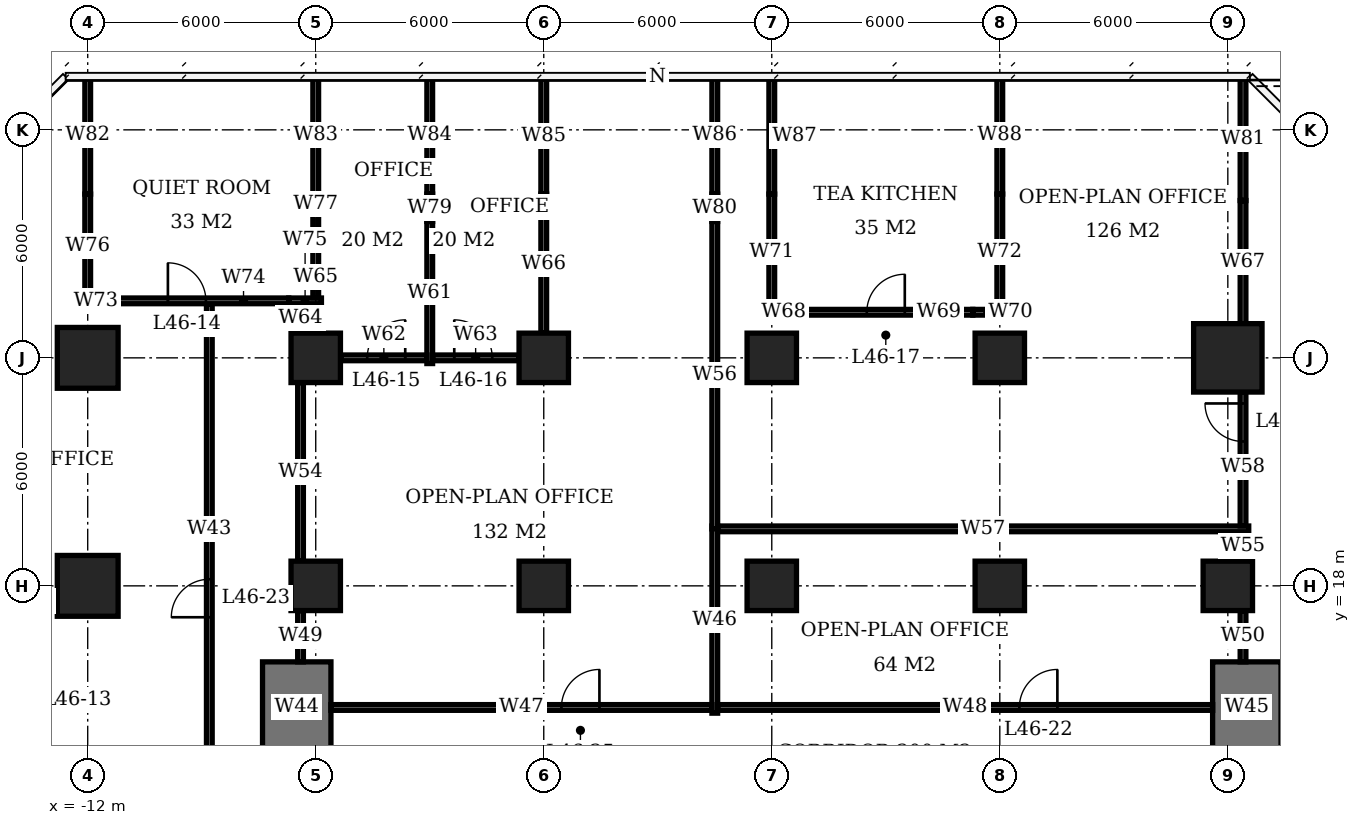
"""IFC4 building model, lengths in metres.
Left out: names, types, materials, properties, quantities, classifications, styles, units other than length and angle.
Written with IfcOpenShell. Run it as: python <this file> out.ifc"""

import sys

from ifc_helpers import new_model, si_unit, direction, frame, frame_2d, origin, origin_2d, place, context, subcontext, project, spatial, rectangle, extrude, element, fill, save


model = new_model("IFC4")
c1 = context("Model", 3, precision=1e-05, world=origin(), true_north=direction((0.0, 1.0)))
c2 = subcontext(c1, "Body", "Model", "MODEL_VIEW")
j1 = project(units=[si_unit("LENGTHUNIT", "METRE"), si_unit("PLANEANGLEUNIT", "RADIAN")], contexts=[c1])
p1 = place(None, origin())
s1 = spatial("IfcSite", under=j1, at=p1, CompositionType="ELEMENT")
p2 = place(p1, origin())
s2 = spatial("IfcBuilding", under=s1, at=p2, CompositionType="ELEMENT")
p3 = place(p2, frame((0.0, 0.0, 188.9)))
s3 = spatial("IfcBuildingStorey", under=s2, at=p3, CompositionType="ELEMENT", Elevation=188.9)
for number, where, z_axis, x_axis in (
    (1, (-12.0, 18.0, 0.0), (0.0, 0.0, 1.0), (1.0, 0.0, 0.0)),
    (2, (-12.0, 24.0, 0.0), (0.0, 0.0, 1.0), (1.0, 0.0, 0.0)),
):
    element("IfcColumn", number, at=place(p3, frame(where, z_axis=z_axis, x_axis=x_axis)), inside=s3, PredefinedType="COLUMN", context=c2, shape_type="SweptSolid", body=[
        extrude(rectangle(XDim=1.6, YDim=1.6, at=origin_2d()), origin(), (0.0, 0.0, 1.0), 3.9),
    ])
for number, where, z_axis, x_axis in (
    (3, (-6.0, 18.0, 0.0), (0.0, 0.0, 1.0), (1.0, 0.0, 0.0)),
    (4, (-6.0, 24.0, 0.0), (0.0, 0.0, 1.0), (1.0, 0.0, 0.0)),
    (5, (0.0, 18.0, 0.0), (0.0, 0.0, 1.0), (1.0, 0.0, 0.0)),
    (6, (0.0, 24.0, 0.0), (0.0, 0.0, 1.0), (1.0, 0.0, 0.0)),
    (7, (6.0, 18.0, 0.0), (0.0, 0.0, 1.0), (1.0, 0.0, 0.0)),
    (8, (6.0, 24.0, 0.0), (0.0, 0.0, 1.0), (1.0, 0.0, 0.0)),
    (9, (12.0, 18.0, 0.0), (0.0, 0.0, 1.0), (1.0, 0.0, 0.0)),
    (10, (12.0, 24.0, 0.0), (0.0, 0.0, 1.0), (1.0, 0.0, 0.0)),
    (11, (18.0, 18.0, 0.0), (0.0, 0.0, 1.0), (1.0, 0.0, 0.0)),
):
    element("IfcColumn", number, at=place(p3, frame(where, z_axis=z_axis, x_axis=x_axis)), inside=s3, PredefinedType="COLUMN", context=c2, shape_type="SweptSolid", body=[
        extrude(rectangle(XDim=1.3, YDim=1.3, at=origin_2d()), origin(), (0.0, 0.0, 1.0), 3.9),
    ])
p4 = place(p3, frame((18.0, 24.0, 0.0), z_axis=(0.0, 0.0, 1.0), x_axis=(1.0, 0.0, 0.0)))
e12 = element("IfcColumn", 12, at=p4, inside=s3, PredefinedType="COLUMN", context=c2, shape_type="SweptSolid", body=[
    extrude(rectangle(XDim=1.8, YDim=1.8, at=origin_2d()), origin(), (0.0, 0.0, 1.0), 3.9),
])
for number, where, z_axis, x_axis in (
    (13, (-6.5, 13.6, 0.0), (0.0, 0.0, 1.0), (0.0, 1.0, 0.0)),
    (14, (18.5, 13.6, 0.0), (0.0, 0.0, 1.0), (0.0, 1.0, 0.0)),
):
    element("IfcWall", number, at=place(p3, frame(where, z_axis=z_axis, x_axis=x_axis)), inside=s3, PredefinedType="SHEAR", context=c2, shape_type="SweptSolid", body=[
        extrude(rectangle(XDim=2.4, YDim=1.8, at=frame_2d((1.2, 0.0))), origin(), (0.0, 0.0, 1.0), 3.9),
    ])
p5 = place(p3, frame((-5.34, 24.0, 0.0), z_axis=(0.0, 0.0, 1.0), x_axis=(1.0, 0.0, 0.0)))
e15 = element("IfcWall", 15, at=p5, inside=s3, PredefinedType="PARTITIONING", context=c2, shape_type="SweptSolid", body=[
    extrude(rectangle(XDim=2.265, YDim=0.15, at=frame_2d((1.133, 0.0))), origin(), (0.0, 0.0, 1.0), 3.65),
])
p6 = place(p5, frame((0.695, 0.0, 0.0)))
e16 = element("IfcOpeningElement", 16, at=p6, cuts=e15, PredefinedType="OPENING", context=c2, shape_type="SweptSolid", body=[
    extrude(rectangle(XDim=1.0, YDim=2.1, at=frame_2d((0.5, 1.05))), frame((0.0, 0.085, 0.0), z_axis=(0.0, -1.0, 0.0), x_axis=(1.0, 0.0, 0.0)), (0.0, 0.0, 1.0), 0.17),
])
p7 = place(p3, frame((-2.925, 24.0, 0.0), z_axis=(0.0, 0.0, 1.0), x_axis=(1.0, 0.0, 0.0)))
e17 = element("IfcWall", 17, at=p7, inside=s3, PredefinedType="PARTITIONING", context=c2, shape_type="SweptSolid", body=[
    extrude(rectangle(XDim=2.265, YDim=0.15, at=frame_2d((1.133, 0.0))), origin(), (0.0, 0.0, 1.0), 3.65),
])
p8 = place(p7, frame((0.57, 0.0, 0.0)))
e18 = element("IfcOpeningElement", 18, at=p8, cuts=e17, PredefinedType="OPENING", context=c2, shape_type="SweptSolid", body=[
    extrude(rectangle(XDim=1.0, YDim=2.1, at=frame_2d((0.5, 1.05))), frame((0.0, 0.085, 0.0), z_axis=(0.0, -1.0, 0.0), x_axis=(1.0, 0.0, 0.0)), (0.0, 0.0, 1.0), 0.17),
])
p9 = place(p3, frame((5.925, 25.2, 0.0), z_axis=(0.0, 0.0, 1.0), x_axis=(1.0, 0.0, 0.0)))
e19 = element("IfcWall", 19, at=p9, inside=s3, PredefinedType="PARTITIONING", context=c2, shape_type="SweptSolid", body=[
    extrude(rectangle(XDim=0.785, YDim=0.15, at=frame_2d((0.393, 0.0))), origin(), (0.0, 0.0, 1.0), 2.65),
])
p10 = place(p3, frame((6.71, 25.2, 0.0), z_axis=(0.0, 0.0, 1.0), x_axis=(1.0, 0.0, 0.0)))
e20 = element("IfcWall", 20, at=p10, inside=s3, PredefinedType="PARTITIONING", context=c2, shape_type="SweptSolid", body=[
    extrude(rectangle(XDim=4.58, YDim=0.15, at=frame_2d((2.29, 0.0))), origin(), (0.0, 0.0, 1.0), 3.65),
])
p11 = place(p10, frame((1.79, 0.0, 0.0)))
e21 = element("IfcOpeningElement", 21, at=p11, cuts=e20, PredefinedType="OPENING", context=c2, shape_type="SweptSolid", body=[
    extrude(rectangle(XDim=1.0, YDim=2.1, at=frame_2d((0.5, 1.05))), frame((0.0, 0.085, 0.0), z_axis=(0.0, -1.0, 0.0), x_axis=(1.0, 0.0, 0.0)), (0.0, 0.0, 1.0), 0.17),
])
p12 = place(p3, frame((11.29, 25.2, 0.0), z_axis=(0.0, 0.0, 1.0), x_axis=(1.0, 0.0, 0.0)))
e22 = element("IfcWall", 22, at=p12, inside=s3, PredefinedType="PARTITIONING", context=c2, shape_type="SweptSolid", body=[
    extrude(rectangle(XDim=0.785, YDim=0.15, at=frame_2d((0.393, 0.0))), origin(), (0.0, 0.0, 1.0), 2.65),
])
p13 = place(p3, frame((-12.075, 25.5, 0.0), z_axis=(0.0, 0.0, 1.0), x_axis=(1.0, 0.0, 0.0)))
e23 = element("IfcWall", 23, at=p13, inside=s3, PredefinedType="PARTITIONING", context=c2, shape_type="SweptSolid", body=[
    extrude(rectangle(XDim=0.585, YDim=0.15, at=frame_2d((0.292, 0.0))), origin(), (0.0, 0.0, 1.0), 2.65),
])
p14 = place(p3, frame((-11.49, 25.5, 0.0), z_axis=(0.0, 0.0, 1.0), x_axis=(1.0, 0.0, 0.0)))
e24 = element("IfcWall", 24, at=p14, inside=s3, PredefinedType="PARTITIONING", context=c2, shape_type="SweptSolid", body=[
    extrude(rectangle(XDim=4.78, YDim=0.15, at=frame_2d((2.39, 0.0))), origin(), (0.0, 0.0, 1.0), 3.65),
])
p15 = place(p14, frame((1.6, 0.0, 0.0)))
e25 = element("IfcOpeningElement", 25, at=p15, cuts=e24, PredefinedType="OPENING", context=c2, shape_type="SweptSolid", body=[
    extrude(rectangle(XDim=1.0, YDim=2.1, at=frame_2d((0.5, 1.05))), frame((0.0, 0.085, 0.0), z_axis=(0.0, -1.0, 0.0), x_axis=(1.0, 0.0, 0.0)), (0.0, 0.0, 1.0), 0.17),
])
p16 = place(p3, frame((-6.71, 25.5, 0.0), z_axis=(0.0, 0.0, 1.0), x_axis=(1.0, 0.0, 0.0)))
e26 = element("IfcWall", 26, at=p16, inside=s3, PredefinedType="PARTITIONING", context=c2, shape_type="SweptSolid", body=[
    extrude(rectangle(XDim=0.86, YDim=0.15, at=frame_2d((0.43, 0.0))), origin(), (0.0, 0.0, 1.0), 2.65),
])
p17 = place(p3, frame((-12.0, 25.575, 0.0), z_axis=(0.0, 0.0, 1.0), x_axis=(0.0, 1.0, 0.0)))
e27 = element("IfcWall", 27, at=p17, inside=s3, PredefinedType="PARTITIONING", context=c2, shape_type="SweptSolid", body=[
    extrude(rectangle(XDim=2.735, YDim=0.15, at=frame_2d((1.368, 0.0))), origin(), (0.0, 0.0, 1.0), 2.65),
])
p18 = place(p3, frame((-12.0, 28.31, 0.0), z_axis=(0.0, 0.0, 1.0), x_axis=(0.0, 1.0, 0.0)))
e28 = element("IfcWall", 28, at=p18, inside=s3, PredefinedType="PARTITIONING", context=c2, shape_type="SweptSolid", body=[
    extrude(rectangle(XDim=3.09, YDim=0.15, at=frame_2d((1.545, 0.0))), origin(), (0.0, 0.0, 1.0), 3.65),
])
p19 = place(p3, frame((-6.0, 24.65, 0.0), z_axis=(0.0, 0.0, 1.0), x_axis=(0.0, 1.0, 0.0)))
e29 = element("IfcWall", 29, at=p19, inside=s3, PredefinedType="PARTITIONING", context=c2, shape_type="SweptSolid", body=[
    extrude(rectangle(XDim=0.775, YDim=0.15, at=frame_2d((0.388, 0.0))), origin(), (0.0, 0.0, 1.0), 2.65),
])
p20 = place(p3, frame((-6.0, 25.575, 0.0), z_axis=(0.0, 0.0, 1.0), x_axis=(0.0, 1.0, 0.0)))
e30 = element("IfcWall", 30, at=p20, inside=s3, PredefinedType="PARTITIONING", context=c2, shape_type="SweptSolid", body=[
    extrude(rectangle(XDim=2.735, YDim=0.15, at=frame_2d((1.368, 0.0))), origin(), (0.0, 0.0, 1.0), 2.65),
])
p21 = place(p3, frame((-6.0, 28.31, 0.0), z_axis=(0.0, 0.0, 1.0), x_axis=(0.0, 1.0, 0.0)))
e31 = element("IfcWall", 31, at=p21, inside=s3, PredefinedType="PARTITIONING", context=c2, shape_type="SweptSolid", body=[
    extrude(rectangle(XDim=3.09, YDim=0.15, at=frame_2d((1.545, 0.0))), origin(), (0.0, 0.0, 1.0), 3.65),
])
p22 = place(p3, frame((-3.0, 23.85, 0.0), z_axis=(0.0, 0.0, 1.0), x_axis=(0.0, 1.0, 0.0)))
e32 = element("IfcWall", 32, at=p22, inside=s3, PredefinedType="PARTITIONING", context=c2, shape_type="SweptSolid", body=[
    extrude(rectangle(XDim=3.74, YDim=0.15, at=frame_2d((1.87, 0.0))), origin(), (0.0, 0.0, 1.0), 3.65),
])
p23 = place(p3, frame((-3.0, 27.59, 0.0), z_axis=(0.0, 0.0, 1.0), x_axis=(0.0, 1.0, 0.0)))
e33 = element("IfcWall", 33, at=p23, inside=s3, PredefinedType="PARTITIONING", context=c2, shape_type="SweptSolid", body=[
    extrude(rectangle(XDim=0.72, YDim=0.15, at=frame_2d((0.36, 0.0))), origin(), (0.0, 0.0, 1.0), 2.65),
])
p24 = place(p3, frame((-3.0, 28.31, 0.0), z_axis=(0.0, 0.0, 1.0), x_axis=(0.0, 1.0, 0.0)))
e34 = element("IfcWall", 34, at=p24, inside=s3, PredefinedType="PARTITIONING", context=c2, shape_type="SweptSolid", body=[
    extrude(rectangle(XDim=3.09, YDim=0.15, at=frame_2d((1.545, 0.0))), origin(), (0.0, 0.0, 1.0), 3.65),
])
p25 = place(p3, frame((0.0, 24.65, 0.0), z_axis=(0.0, 0.0, 1.0), x_axis=(0.0, 1.0, 0.0)))
e35 = element("IfcWall", 35, at=p25, inside=s3, PredefinedType="PARTITIONING", context=c2, shape_type="SweptSolid", body=[
    extrude(rectangle(XDim=3.66, YDim=0.15, at=frame_2d((1.83, 0.0))), origin(), (0.0, 0.0, 1.0), 2.65),
])
p26 = place(p3, frame((0.0, 28.31, 0.0), z_axis=(0.0, 0.0, 1.0), x_axis=(0.0, 1.0, 0.0)))
e36 = element("IfcWall", 36, at=p26, inside=s3, PredefinedType="PARTITIONING", context=c2, shape_type="SweptSolid", body=[
    extrude(rectangle(XDim=3.04, YDim=0.15, at=frame_2d((1.52, 0.0))), origin(), (0.0, 0.0, 1.0), 3.65),
])
p27 = place(p3, frame((6.0, 25.275, 0.0), z_axis=(0.0, 0.0, 1.0), x_axis=(0.0, 1.0, 0.0)))
e37 = element("IfcWall", 37, at=p27, inside=s3, PredefinedType="PARTITIONING", context=c2, shape_type="SweptSolid", body=[
    extrude(rectangle(XDim=3.035, YDim=0.15, at=frame_2d((1.518, 0.0))), origin(), (0.0, 0.0, 1.0), 2.65),
])
p28 = place(p3, frame((6.0, 28.31, 0.0), z_axis=(0.0, 0.0, 1.0), x_axis=(0.0, 1.0, 0.0)))
e38 = element("IfcWall", 38, at=p28, inside=s3, PredefinedType="PARTITIONING", context=c2, shape_type="SweptSolid", body=[
    extrude(rectangle(XDim=3.04, YDim=0.15, at=frame_2d((1.52, 0.0))), origin(), (0.0, 0.0, 1.0), 3.65),
])
p29 = place(p3, frame((12.0, 25.275, 0.0), z_axis=(0.0, 0.0, 1.0), x_axis=(0.0, 1.0, 0.0)))
e39 = element("IfcWall", 39, at=p29, inside=s3, PredefinedType="PARTITIONING", context=c2, shape_type="SweptSolid", body=[
    extrude(rectangle(XDim=3.035, YDim=0.15, at=frame_2d((1.518, 0.0))), origin(), (0.0, 0.0, 1.0), 2.65),
])
p30 = place(p3, frame((12.0, 28.31, 0.0), z_axis=(0.0, 0.0, 1.0), x_axis=(0.0, 1.0, 0.0)))
e40 = element("IfcWall", 40, at=p30, inside=s3, PredefinedType="PARTITIONING", context=c2, shape_type="SweptSolid", body=[
    extrude(rectangle(XDim=3.09, YDim=0.15, at=frame_2d((1.545, 0.0))), origin(), (0.0, 0.0, 1.0), 3.65),
])
p31 = place(p3, frame((-8.8, 13.575, 0.0), z_axis=(0.0, 0.0, 1.0), x_axis=(0.0, 1.0, 0.0)))
e41 = element("IfcWall", 41, at=p31, inside=s3, PredefinedType="PARTITIONING", context=c2, shape_type="SweptSolid", body=[
    extrude(rectangle(XDim=11.85, YDim=0.15, at=frame_2d((5.925, 0.0))), origin(), (0.0, 0.0, 1.0), 3.65),
])
p32 = place(p31, frame((3.599, 0.0, 0.0)))
e42 = element("IfcOpeningElement", 42, at=p32, cuts=e41, PredefinedType="OPENING", context=c2, shape_type="SweptSolid", body=[
    extrude(rectangle(XDim=1.0, YDim=2.1, at=frame_2d((0.5, 1.05))), frame((0.0, 0.085, 0.0), z_axis=(0.0, -1.0, 0.0), x_axis=(1.0, 0.0, 0.0)), (0.0, 0.0, 1.0), 0.17),
])
p33 = place(p3, frame((-6.4, 16.0, 0.0), z_axis=(0.0, 0.0, 1.0), x_axis=(0.0, 1.0, 0.0)))
e43 = element("IfcWall", 43, at=p33, inside=s3, PredefinedType="PARTITIONING", context=c2, shape_type="SweptSolid", body=[
    extrude(rectangle(XDim=1.35, YDim=0.15, at=frame_2d((0.675, 0.0))), origin(), (0.0, 0.0, 1.0), 3.65),
])
p34 = place(p3, frame((-6.4, 18.65, 0.0), z_axis=(0.0, 0.0, 1.0), x_axis=(0.0, 1.0, 0.0)))
e44 = element("IfcWall", 44, at=p34, inside=s3, PredefinedType="PARTITIONING", context=c2, shape_type="SweptSolid", body=[
    extrude(rectangle(XDim=4.7, YDim=0.15, at=frame_2d((2.35, 0.0))), origin(), (0.0, 0.0, 1.0), 3.65),
])
p35 = place(p3, frame((-6.4, 24.65, 0.0), z_axis=(0.0, 0.0, 1.0), x_axis=(0.0, 1.0, 0.0)))
e45 = element("IfcWall", 45, at=p35, inside=s3, PredefinedType="PARTITIONING", context=c2, shape_type="SweptSolid", body=[
    extrude(rectangle(XDim=0.775, YDim=0.15, at=frame_2d((0.388, 0.0))), origin(), (0.0, 0.0, 1.0), 2.65),
])
p36 = place(p3, frame((-5.6, 14.8, 0.0), z_axis=(0.0, 0.0, 1.0), x_axis=(1.0, 0.0, 0.0)))
e46 = element("IfcWall", 46, at=p36, inside=s3, PredefinedType="PARTITIONING", context=c2, shape_type="SweptSolid", body=[
    extrude(rectangle(XDim=10.025, YDim=0.15, at=frame_2d((5.013, 0.0))), origin(), (0.0, 0.0, 1.0), 3.65),
])
p37 = place(p36, frame((6.065, 0.0, 0.0)))
e47 = element("IfcOpeningElement", 47, at=p37, cuts=e46, PredefinedType="OPENING", context=c2, shape_type="SweptSolid", body=[
    extrude(rectangle(XDim=1.0, YDim=2.1, at=frame_2d((0.5, 1.05))), frame((0.0, 0.085, 0.0), z_axis=(0.0, -1.0, 0.0), x_axis=(1.0, 0.0, 0.0)), (0.0, 0.0, 1.0), 0.17),
])
p38 = place(p3, frame((4.5, 14.65, 0.0), z_axis=(0.0, 0.0, 1.0), x_axis=(0.0, 1.0, 0.0)))
e48 = element("IfcWall", 48, at=p38, inside=s3, PredefinedType="PARTITIONING", context=c2, shape_type="SweptSolid", body=[
    extrude(rectangle(XDim=4.925, YDim=0.15, at=frame_2d((2.462, 0.0))), origin(), (0.0, 0.0, 1.0), 3.65),
])
p39 = place(p3, frame((4.575, 14.8, 0.0), z_axis=(0.0, 0.0, 1.0), x_axis=(1.0, 0.0, 0.0)))
e49 = element("IfcWall", 49, at=p39, inside=s3, PredefinedType="PARTITIONING", context=c2, shape_type="SweptSolid", body=[
    extrude(rectangle(XDim=13.025, YDim=0.15, at=frame_2d((6.513, 0.0))), origin(), (0.0, 0.0, 1.0), 3.65),
])
p40 = place(p39, frame((7.94, 0.0, 0.0)))
e50 = element("IfcOpeningElement", 50, at=p40, cuts=e49, PredefinedType="OPENING", context=c2, shape_type="SweptSolid", body=[
    extrude(rectangle(XDim=1.0, YDim=2.1, at=frame_2d((0.5, 1.05))), frame((0.0, 0.085, 0.0), z_axis=(0.0, -1.0, 0.0), x_axis=(1.0, 0.0, 0.0)), (0.0, 0.0, 1.0), 0.17),
])
p41 = place(p3, frame((4.5, 19.5, 0.0), z_axis=(0.0, 0.0, 1.0), x_axis=(0.0, 1.0, 0.0)))
e51 = element("IfcWall", 51, at=p41, inside=s3, PredefinedType="PARTITIONING", context=c2, shape_type="SweptSolid", body=[
    extrude(rectangle(XDim=8.09, YDim=0.15, at=frame_2d((4.045, 0.0))), origin(), (0.0, 0.0, 1.0), 3.65),
])
p42 = place(p3, frame((4.5, 27.59, 0.0), z_axis=(0.0, 0.0, 1.0), x_axis=(0.0, 1.0, 0.0)))
e52 = element("IfcWall", 52, at=p42, inside=s3, PredefinedType="PARTITIONING", context=c2, shape_type="SweptSolid", body=[
    extrude(rectangle(XDim=0.72, YDim=0.15, at=frame_2d((0.36, 0.0))), origin(), (0.0, 0.0, 1.0), 2.65),
])
p43 = place(p3, frame((4.5, 28.31, 0.0), z_axis=(0.0, 0.0, 1.0), x_axis=(0.0, 1.0, 0.0)))
e53 = element("IfcWall", 53, at=p43, inside=s3, PredefinedType="PARTITIONING", context=c2, shape_type="SweptSolid", body=[
    extrude(rectangle(XDim=3.09, YDim=0.15, at=frame_2d((1.545, 0.0))), origin(), (0.0, 0.0, 1.0), 3.65),
])
p44 = place(p3, frame((4.575, 19.5, 0.0), z_axis=(0.0, 0.0, 1.0), x_axis=(1.0, 0.0, 0.0)))
e54 = element("IfcWall", 54, at=p44, inside=s3, PredefinedType="PARTITIONING", context=c2, shape_type="SweptSolid", body=[
    extrude(rectangle(XDim=13.975, YDim=0.15, at=frame_2d((6.988, 0.0))), origin(), (0.0, 0.0, 1.0), 3.65),
])
p45 = place(p3, frame((18.4, 16.0, 0.0), z_axis=(0.0, 0.0, 1.0), x_axis=(0.0, 1.0, 0.0)))
e55 = element("IfcWall", 55, at=p45, inside=s3, PredefinedType="PARTITIONING", context=c2, shape_type="SweptSolid", body=[
    extrude(rectangle(XDim=1.35, YDim=0.15, at=frame_2d((0.675, 0.0))), origin(), (0.0, 0.0, 1.0), 3.65),
])
p46 = place(p3, frame((18.4, 18.65, 0.0), z_axis=(0.0, 0.0, 1.0), x_axis=(0.0, 1.0, 0.0)))
e56 = element("IfcWall", 56, at=p46, inside=s3, PredefinedType="PARTITIONING", context=c2, shape_type="SweptSolid", body=[
    extrude(rectangle(XDim=0.775, YDim=0.15, at=frame_2d((0.388, 0.0))), origin(), (0.0, 0.0, 1.0), 3.65),
])
p47 = place(p3, frame((18.4, 19.575, 0.0), z_axis=(0.0, 0.0, 1.0), x_axis=(0.0, 1.0, 0.0)))
e57 = element("IfcWall", 57, at=p47, inside=s3, PredefinedType="PARTITIONING", context=c2, shape_type="SweptSolid", body=[
    extrude(rectangle(XDim=3.525, YDim=0.15, at=frame_2d((1.763, 0.0))), origin(), (0.0, 0.0, 1.0), 3.65),
])
p48 = place(p47, frame((2.225, 0.0, 0.0)))
e58 = element("IfcOpeningElement", 58, at=p48, cuts=e57, PredefinedType="OPENING", context=c2, shape_type="SweptSolid", body=[
    extrude(rectangle(XDim=1.0, YDim=2.1, at=frame_2d((0.5, 1.05))), frame((0.0, 0.085, 0.0), z_axis=(0.0, -1.0, 0.0), x_axis=(1.0, 0.0, 0.0)), (0.0, 0.0, 1.0), 0.17),
])
p49 = place(p3, frame((18.4, 24.9, 0.0), z_axis=(0.0, 0.0, 1.0), x_axis=(0.0, 1.0, 0.0)))
e59 = element("IfcWall", 59, at=p49, inside=s3, PredefinedType="PARTITIONING", context=c2, shape_type="SweptSolid", body=[
    extrude(rectangle(XDim=3.24, YDim=0.15, at=frame_2d((1.62, 0.0))), origin(), (0.0, 0.0, 1.0), 2.65),
])
p50 = place(p3, frame((18.4, 28.14, 0.0), z_axis=(0.0, 0.0, 1.0), x_axis=(0.0, 1.0, 0.0)))
e60 = element("IfcWall", 60, at=p50, inside=s3, PredefinedType="PARTITIONING", context=c2, shape_type="SweptSolid", body=[
    extrude(rectangle(XDim=3.26, YDim=0.15, at=frame_2d((1.63, 0.0))), origin(), (0.0, 0.0, 1.0), 3.65),
])
p51 = place(p15, origin())
e61 = element("IfcDoor", 61, at=p51, inside=s3, OperationType="SINGLE_SWING_LEFT", PredefinedType="DOOR", context=c2, shape_type="SweptSolid", body=[
    extrude(rectangle(XDim=1.0, YDim=2.1, at=frame_2d((0.5, 1.05))), frame((0.0, 0.025, 0.0), z_axis=(0.0, -1.0, 0.0), x_axis=(1.0, 0.0, 0.0)), (0.0, 0.0, 1.0), 0.05),
])
fill(e25, e61)
p52 = place(p6, origin())
e62 = element("IfcDoor", 62, at=p52, inside=s3, OperationType="SINGLE_SWING_RIGHT", PredefinedType="DOOR", context=c2, shape_type="SweptSolid", body=[
    extrude(rectangle(XDim=1.0, YDim=2.1, at=frame_2d((0.5, 1.05))), frame((0.0, 0.025, 0.0), z_axis=(0.0, -1.0, 0.0), x_axis=(1.0, 0.0, 0.0)), (0.0, 0.0, 1.0), 0.05),
])
fill(e16, e62)
p53 = place(p8, origin())
e63 = element("IfcDoor", 63, at=p53, inside=s3, OperationType="SINGLE_SWING_LEFT", PredefinedType="DOOR", context=c2, shape_type="SweptSolid", body=[
    extrude(rectangle(XDim=1.0, YDim=2.1, at=frame_2d((0.5, 1.05))), frame((0.0, 0.025, 0.0), z_axis=(0.0, -1.0, 0.0), x_axis=(1.0, 0.0, 0.0)), (0.0, 0.0, 1.0), 0.05),
])
fill(e18, e63)
p54 = place(p11, origin())
e64 = element("IfcDoor", 64, at=p54, inside=s3, OperationType="SINGLE_SWING_RIGHT", PredefinedType="DOOR", context=c2, shape_type="SweptSolid", body=[
    extrude(rectangle(XDim=1.0, YDim=2.1, at=frame_2d((0.5, 1.05))), frame((0.0, 0.025, 0.0), z_axis=(0.0, -1.0, 0.0), x_axis=(1.0, 0.0, 0.0)), (0.0, 0.0, 1.0), 0.05),
])
fill(e21, e64)
p55 = place(p40, origin())
e65 = element("IfcDoor", 65, at=p55, inside=s3, OperationType="SINGLE_SWING_RIGHT", PredefinedType="DOOR", context=c2, shape_type="SweptSolid", body=[
    extrude(rectangle(XDim=1.0, YDim=2.1, at=frame_2d((0.5, 1.05))), frame((0.0, 0.025, 0.0), z_axis=(0.0, -1.0, 0.0), x_axis=(1.0, 0.0, 0.0)), (0.0, 0.0, 1.0), 0.05),
])
fill(e50, e65)
p56 = place(p32, origin())
e66 = element("IfcDoor", 66, at=p56, inside=s3, OperationType="SINGLE_SWING_LEFT", PredefinedType="DOOR", context=c2, shape_type="SweptSolid", body=[
    extrude(rectangle(XDim=1.0, YDim=2.1, at=frame_2d((0.5, 1.05))), frame((0.0, 0.025, 0.0), z_axis=(0.0, -1.0, 0.0), x_axis=(1.0, 0.0, 0.0)), (0.0, 0.0, 1.0), 0.05),
])
fill(e42, e66)
p57 = place(p48, origin())
e67 = element("IfcDoor", 67, at=p57, inside=s3, OperationType="SINGLE_SWING_RIGHT", PredefinedType="DOOR", context=c2, shape_type="SweptSolid", body=[
    extrude(rectangle(XDim=1.0, YDim=2.1, at=frame_2d((0.5, 1.05))), frame((0.0, 0.025, 0.0), z_axis=(0.0, -1.0, 0.0), x_axis=(1.0, 0.0, 0.0)), (0.0, 0.0, 1.0), 0.05),
])
fill(e58, e67)
p58 = place(p37, origin())
e68 = element("IfcDoor", 68, at=p58, inside=s3, OperationType="SINGLE_SWING_RIGHT", PredefinedType="DOOR", context=c2, shape_type="SweptSolid", body=[
    extrude(rectangle(XDim=1.0, YDim=2.1, at=frame_2d((0.5, 1.05))), frame((0.0, 0.025, 0.0), z_axis=(0.0, -1.0, 0.0), x_axis=(1.0, 0.0, 0.0)), (0.0, 0.0, 1.0), 0.05),
])
fill(e47, e68)
save(model, sys.argv[1])
